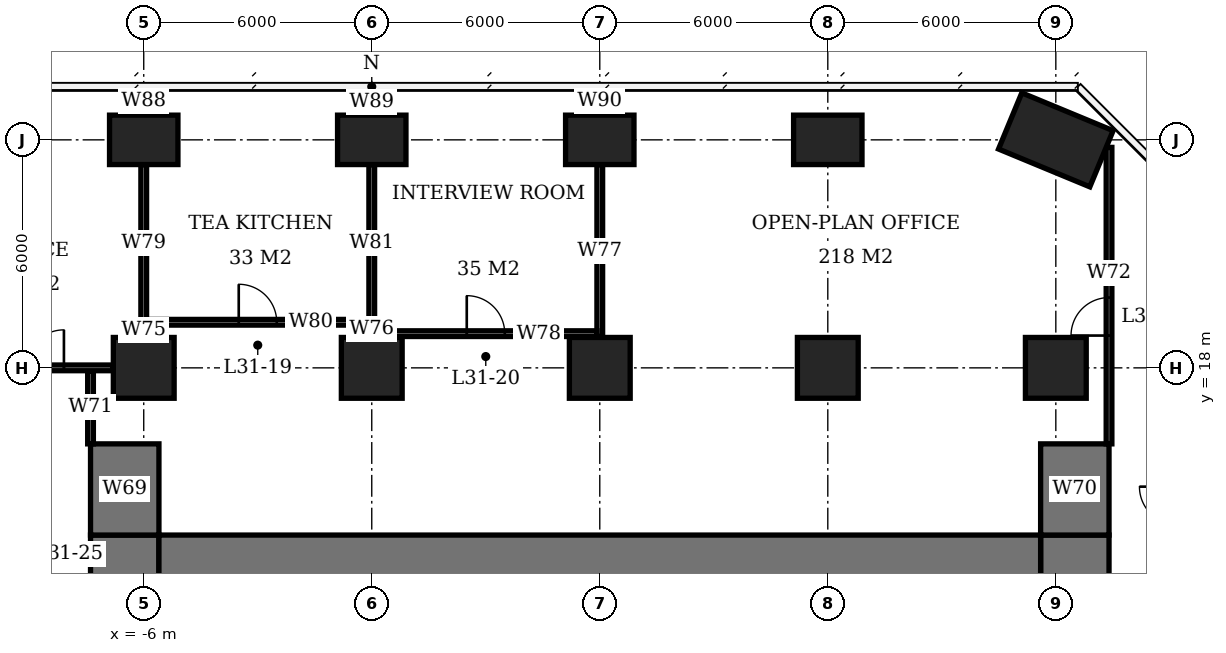
"""IFC4 building model, lengths in metres.
Left out: names, types, materials, properties, quantities, classifications, styles, units other than length and angle.
Written with IfcOpenShell. Run it as: python <this file> out.ifc"""

import sys

from ifc_helpers import new_model, si_unit, direction, frame, frame_2d, origin, origin_2d, place, context, subcontext, project, spatial, rectangle, extrude, element, fill, save


model = new_model("IFC4")
c1 = context("Model", 3, precision=1e-05, world=origin(), true_north=direction((0.0, 1.0)))
c2 = subcontext(c1, "Body", "Model", "MODEL_VIEW")
j1 = project(units=[si_unit("LENGTHUNIT", "METRE"), si_unit("PLANEANGLEUNIT", "RADIAN")], contexts=[c1])
p1 = place(None, origin())
s1 = spatial("IfcSite", under=j1, at=p1, CompositionType="ELEMENT")
p2 = place(p1, origin())
s2 = spatial("IfcBuilding", under=s1, at=p2, CompositionType="ELEMENT")
p3 = place(p2, frame((0.0, 0.0, 128.9)))
s3 = spatial("IfcBuildingStorey", under=s2, at=p3, CompositionType="ELEMENT", Elevation=128.9)
p4 = place(p3, frame((-6.0, 18.0, 0.0), z_axis=(0.0, 0.0, 1.0), x_axis=(1.0, 0.0, 0.0)))
e1 = element("IfcColumn", 1, at=p4, inside=s3, PredefinedType="COLUMN", context=c2, shape_type="SweptSolid", body=[
    extrude(rectangle(XDim=1.6, YDim=1.6, at=origin_2d()), origin(), (0.0, 0.0, 1.0), 3.9),
])
p5 = place(p3, frame((-6.0, 24.0, 0.0), z_axis=(0.0, 0.0, 1.0), x_axis=(1.0, 0.0, 0.0)))
e2 = element("IfcColumn", 2, at=p5, inside=s3, PredefinedType="COLUMN", context=c2, shape_type="SweptSolid", body=[
    extrude(rectangle(XDim=1.8, YDim=1.3, at=origin_2d()), origin(), (0.0, 0.0, 1.0), 3.9),
])
p6 = place(p3, frame((0.0, 18.0, 0.0), z_axis=(0.0, 0.0, 1.0), x_axis=(1.0, 0.0, 0.0)))
e3 = element("IfcColumn", 3, at=p6, inside=s3, PredefinedType="COLUMN", context=c2, shape_type="SweptSolid", body=[
    extrude(rectangle(XDim=1.6, YDim=1.6, at=origin_2d()), origin(), (0.0, 0.0, 1.0), 3.9),
])
p7 = place(p3, frame((0.0, 24.0, 0.0), z_axis=(0.0, 0.0, 1.0), x_axis=(1.0, 0.0, 0.0)))
e4 = element("IfcColumn", 4, at=p7, inside=s3, PredefinedType="COLUMN", context=c2, shape_type="SweptSolid", body=[
    extrude(rectangle(XDim=1.8, YDim=1.3, at=origin_2d()), origin(), (0.0, 0.0, 1.0), 3.9),
])
p8 = place(p3, frame((6.0, 18.0, 0.0), z_axis=(0.0, 0.0, 1.0), x_axis=(1.0, 0.0, 0.0)))
e5 = element("IfcColumn", 5, at=p8, inside=s3, PredefinedType="COLUMN", context=c2, shape_type="SweptSolid", body=[
    extrude(rectangle(XDim=1.6, YDim=1.6, at=origin_2d()), origin(), (0.0, 0.0, 1.0), 3.9),
])
p9 = place(p3, frame((6.0, 24.0, 0.0), z_axis=(0.0, 0.0, 1.0), x_axis=(1.0, 0.0, 0.0)))
e6 = element("IfcColumn", 6, at=p9, inside=s3, PredefinedType="COLUMN", context=c2, shape_type="SweptSolid", body=[
    extrude(rectangle(XDim=1.8, YDim=1.3, at=origin_2d()), origin(), (0.0, 0.0, 1.0), 3.9),
])
p10 = place(p3, frame((12.0, 18.0, 0.0), z_axis=(0.0, 0.0, 1.0), x_axis=(1.0, 0.0, 0.0)))
e7 = element("IfcColumn", 7, at=p10, inside=s3, PredefinedType="COLUMN", context=c2, shape_type="SweptSolid", body=[
    extrude(rectangle(XDim=1.6, YDim=1.6, at=origin_2d()), origin(), (0.0, 0.0, 1.0), 3.9),
])
p11 = place(p3, frame((12.0, 24.0, 0.0), z_axis=(0.0, 0.0, 1.0), x_axis=(1.0, 0.0, 0.0)))
e8 = element("IfcColumn", 8, at=p11, inside=s3, PredefinedType="COLUMN", context=c2, shape_type="SweptSolid", body=[
    extrude(rectangle(XDim=1.8, YDim=1.3, at=origin_2d()), origin(), (0.0, 0.0, 1.0), 3.9),
])
p12 = place(p3, frame((18.0, 18.0, 0.0), z_axis=(0.0, 0.0, 1.0), x_axis=(1.0, 0.0, 0.0)))
e9 = element("IfcColumn", 9, at=p12, inside=s3, PredefinedType="COLUMN", context=c2, shape_type="SweptSolid", body=[
    extrude(rectangle(XDim=1.6, YDim=1.6, at=origin_2d()), origin(), (0.0, 0.0, 1.0), 3.9),
])
p13 = place(p3, frame((18.0, 24.0, 0.0), z_axis=(0.0, 0.0, 1.0), x_axis=(0.923879532511, -0.382683432365, 0.0)))
e10 = element("IfcColumn", 10, at=p13, inside=s3, PredefinedType="COLUMN", context=c2, shape_type="SweptSolid", body=[
    extrude(rectangle(XDim=2.6, YDim=1.6, at=origin_2d()), origin(), (0.0, 0.0, 1.0), 3.9),
])
p14 = place(p3, frame((-5.6, 12.6, 0.0), z_axis=(0.0, 0.0, 1.0), x_axis=(1.0, 0.0, 0.0)))
e11 = element("IfcWall", 11, at=p14, inside=s3, PredefinedType="SHEAR", context=c2, shape_type="SweptSolid", body=[
    extrude(rectangle(XDim=23.2, YDim=2.0, at=frame_2d((11.6, 0.0))), origin(), (0.0, 0.0, 1.0), 3.9),
])
p15 = place(p3, frame((-6.5, -7.6, 0.0), z_axis=(0.0, 0.0, 1.0), x_axis=(0.0, 1.0, 0.0)))
e12 = element("IfcWall", 12, at=p15, inside=s3, PredefinedType="SHEAR", context=c2, shape_type="SweptSolid", body=[
    extrude(rectangle(XDim=21.2, YDim=1.8, at=frame_2d((10.6, 0.0))), origin(), (0.0, 0.0, 1.0), 3.9),
])
p16 = place(p15, frame((7.8, 0.0, 0.0)))
e13 = element("IfcOpeningElement", 13, at=p16, cuts=e12, PredefinedType="OPENING", context=c2, shape_type="SweptSolid", body=[
    extrude(rectangle(XDim=1.8, YDim=2.4, at=frame_2d((0.9, 1.2))), frame((0.0, 0.91, 0.0), z_axis=(0.0, -1.0, 0.0), x_axis=(1.0, 0.0, 0.0)), (0.0, 0.0, 1.0), 1.82),
])
p17 = place(p3, frame((18.5, -7.6, 0.0), z_axis=(0.0, 0.0, 1.0), x_axis=(0.0, 1.0, 0.0)))
e14 = element("IfcWall", 14, at=p17, inside=s3, PredefinedType="SHEAR", context=c2, shape_type="SweptSolid", body=[
    extrude(rectangle(XDim=21.2, YDim=1.8, at=frame_2d((10.6, 0.0))), origin(), (0.0, 0.0, 1.0), 3.9),
])
p18 = place(p17, frame((9.2, 0.0, 0.0)))
e15 = element("IfcOpeningElement", 15, at=p18, cuts=e14, PredefinedType="OPENING", context=c2, shape_type="SweptSolid", body=[
    extrude(rectangle(XDim=1.8, YDim=2.4, at=frame_2d((0.9, 1.2))), frame((0.0, 0.91, 0.0), z_axis=(0.0, -1.0, 0.0), x_axis=(1.0, 0.0, 0.0)), (0.0, 0.0, 1.0), 1.82),
])
for number, where, z_axis, x_axis in (
    (16, (-6.5, 13.6, 0.0), (0.0, 0.0, 1.0), (0.0, 1.0, 0.0)),
    (17, (18.5, 13.6, 0.0), (0.0, 0.0, 1.0), (0.0, 1.0, 0.0)),
):
    element("IfcWall", number, at=place(p3, frame(where, z_axis=z_axis, x_axis=x_axis)), inside=s3, PredefinedType="SHEAR", context=c2, shape_type="SweptSolid", body=[
        extrude(rectangle(XDim=2.4, YDim=1.8, at=frame_2d((1.2, 0.0))), origin(), (0.0, 0.0, 1.0), 3.9),
    ])
p19 = place(p3, frame((-11.2, 18.0, 0.0), z_axis=(0.0, 0.0, 1.0), x_axis=(1.0, 0.0, 0.0)))
e18 = element("IfcWall", 18, at=p19, inside=s3, PredefinedType="PARTITIONING", context=c2, shape_type="SweptSolid", body=[
    extrude(rectangle(XDim=4.4, YDim=0.15, at=frame_2d((2.2, 0.0))), origin(), (0.0, 0.0, 1.0), 3.65),
])
p20 = place(p19, frame((2.1, 0.0, 0.0)))
e19 = element("IfcOpeningElement", 19, at=p20, cuts=e18, PredefinedType="OPENING", context=c2, shape_type="SweptSolid", body=[
    extrude(rectangle(XDim=1.0, YDim=2.1, at=frame_2d((0.5, 1.05))), frame((0.0, 0.085, 0.0), z_axis=(0.0, -1.0, 0.0), x_axis=(1.0, 0.0, 0.0)), (0.0, 0.0, 1.0), 0.17),
])
p21 = place(p3, frame((0.075, 18.9, 0.0), z_axis=(0.0, 0.0, 1.0), x_axis=(1.0, 0.0, 0.0)))
e20 = element("IfcWall", 20, at=p21, inside=s3, PredefinedType="PARTITIONING", context=c2, shape_type="SweptSolid", body=[
    extrude(rectangle(XDim=5.85, YDim=0.15, at=frame_2d((2.925, 0.0))), origin(), (0.0, 0.0, 1.0), 3.65),
])
p22 = place(p21, frame((2.425, 0.0, 0.0)))
e21 = element("IfcOpeningElement", 21, at=p22, cuts=e20, PredefinedType="OPENING", context=c2, shape_type="SweptSolid", body=[
    extrude(rectangle(XDim=1.0, YDim=2.1, at=frame_2d((0.5, 1.05))), frame((0.0, 0.085, 0.0), z_axis=(0.0, -1.0, 0.0), x_axis=(1.0, 0.0, 0.0)), (0.0, 0.0, 1.0), 0.17),
])
p23 = place(p3, frame((-5.925, 19.2, 0.0), z_axis=(0.0, 0.0, 1.0), x_axis=(1.0, 0.0, 0.0)))
e22 = element("IfcWall", 22, at=p23, inside=s3, PredefinedType="PARTITIONING", context=c2, shape_type="SweptSolid", body=[
    extrude(rectangle(XDim=5.85, YDim=0.15, at=frame_2d((2.925, 0.0))), origin(), (0.0, 0.0, 1.0), 3.65),
])
p24 = place(p23, frame((2.425, 0.0, 0.0)))
e23 = element("IfcOpeningElement", 23, at=p24, cuts=e22, PredefinedType="OPENING", context=c2, shape_type="SweptSolid", body=[
    extrude(rectangle(XDim=1.0, YDim=2.1, at=frame_2d((0.5, 1.05))), frame((0.0, 0.085, 0.0), z_axis=(0.0, -1.0, 0.0), x_axis=(1.0, 0.0, 0.0)), (0.0, 0.0, 1.0), 0.17),
])
p25 = place(p3, frame((-6.0, 18.8, 0.0), z_axis=(0.0, 0.0, 1.0), x_axis=(0.0, 1.0, 0.0)))
e24 = element("IfcWall", 24, at=p25, inside=s3, PredefinedType="PARTITIONING", context=c2, shape_type="SweptSolid", body=[
    extrude(rectangle(XDim=0.4, YDim=0.15, at=frame_2d((0.2, 0.0))), origin(), (0.0, 0.0, 1.0), 3.65),
])
p26 = place(p3, frame((-6.0, 19.2, 0.0), z_axis=(0.0, 0.0, 1.0), x_axis=(0.0, 1.0, 0.0)))
e25 = element("IfcWall", 25, at=p26, inside=s3, PredefinedType="PARTITIONING", context=c2, shape_type="SweptSolid", body=[
    extrude(rectangle(XDim=4.15, YDim=0.15, at=frame_2d((2.075, 0.0))), origin(), (0.0, 0.0, 1.0), 3.65),
])
p27 = place(p3, frame((-6.0, 24.65, 0.0), z_axis=(0.0, 0.0, 1.0), x_axis=(0.0, 1.0, 0.0)))
e26 = element("IfcWall", 26, at=p27, inside=s3, PredefinedType="PARTITIONING", context=c2, shape_type="SweptSolid", body=[
    extrude(rectangle(XDim=0.75, YDim=0.15, at=frame_2d((0.375, 0.0))), origin(), (0.0, 0.0, 1.0), 3.65),
])
p28 = place(p3, frame((0.0, 18.825, 0.0), z_axis=(0.0, 0.0, 1.0), x_axis=(0.0, 1.0, 0.0)))
e27 = element("IfcWall", 27, at=p28, inside=s3, PredefinedType="PARTITIONING", context=c2, shape_type="SweptSolid", body=[
    extrude(rectangle(XDim=0.375, YDim=0.15, at=frame_2d((0.188, 0.0))), origin(), (0.0, 0.0, 1.0), 3.65),
])
p29 = place(p3, frame((0.0, 19.2, 0.0), z_axis=(0.0, 0.0, 1.0), x_axis=(0.0, 1.0, 0.0)))
e28 = element("IfcWall", 28, at=p29, inside=s3, PredefinedType="PARTITIONING", context=c2, shape_type="SweptSolid", body=[
    extrude(rectangle(XDim=4.15, YDim=0.15, at=frame_2d((2.075, 0.0))), origin(), (0.0, 0.0, 1.0), 3.65),
])
p30 = place(p3, frame((0.0, 24.65, 0.0), z_axis=(0.0, 0.0, 1.0), x_axis=(0.0, 1.0, 0.0)))
e29 = element("IfcWall", 29, at=p30, inside=s3, PredefinedType="PARTITIONING", context=c2, shape_type="SweptSolid", body=[
    extrude(rectangle(XDim=0.7, YDim=0.15, at=frame_2d((0.35, 0.0))), origin(), (0.0, 0.0, 1.0), 3.65),
])
p31 = place(p3, frame((6.0, 18.825, 0.0), z_axis=(0.0, 0.0, 1.0), x_axis=(0.0, 1.0, 0.0)))
e30 = element("IfcWall", 30, at=p31, inside=s3, PredefinedType="PARTITIONING", context=c2, shape_type="SweptSolid", body=[
    extrude(rectangle(XDim=4.525, YDim=0.15, at=frame_2d((2.263, 0.0))), origin(), (0.0, 0.0, 1.0), 3.65),
])
p32 = place(p3, frame((6.0, 24.65, 0.0), z_axis=(0.0, 0.0, 1.0), x_axis=(0.0, 1.0, 0.0)))
e31 = element("IfcWall", 31, at=p32, inside=s3, PredefinedType="PARTITIONING", context=c2, shape_type="SweptSolid", body=[
    extrude(rectangle(XDim=0.75, YDim=0.15, at=frame_2d((0.375, 0.0))), origin(), (0.0, 0.0, 1.0), 3.65),
])
p33 = place(p3, frame((-7.4, 16.0, 0.0), z_axis=(0.0, 0.0, 1.0), x_axis=(0.0, 1.0, 0.0)))
e32 = element("IfcWall", 32, at=p33, inside=s3, PredefinedType="PARTITIONING", context=c2, shape_type="SweptSolid", body=[
    extrude(rectangle(XDim=1.925, YDim=0.15, at=frame_2d((0.962, 0.0))), origin(), (0.0, 0.0, 1.0), 3.65),
])
p34 = place(p3, frame((19.4, 16.0, 0.0), z_axis=(0.0, 0.0, 1.0), x_axis=(0.0, 1.0, 0.0)))
e33 = element("IfcWall", 33, at=p34, inside=s3, PredefinedType="PARTITIONING", context=c2, shape_type="SweptSolid", body=[
    extrude(rectangle(XDim=7.802, YDim=0.15, at=frame_2d((3.901, 0.0))), origin(), (0.0, 0.0, 1.0), 3.65),
])
p35 = place(p34, frame((2.85, 0.0, 0.0)))
e34 = element("IfcOpeningElement", 34, at=p35, cuts=e33, PredefinedType="OPENING", context=c2, shape_type="SweptSolid", body=[
    extrude(rectangle(XDim=1.0, YDim=2.1, at=frame_2d((0.5, 1.05))), frame((0.0, 0.085, 0.0), z_axis=(0.0, -1.0, 0.0), x_axis=(1.0, 0.0, 0.0)), (0.0, 0.0, 1.0), 0.17),
])
p36 = place(p20, origin())
e35 = element("IfcDoor", 35, at=p36, inside=s3, OperationType="SINGLE_SWING_RIGHT", PredefinedType="DOOR", context=c2, shape_type="SweptSolid", body=[
    extrude(rectangle(XDim=1.0, YDim=2.1, at=frame_2d((0.5, 1.05))), frame((0.0, 0.025, 0.0), z_axis=(0.0, -1.0, 0.0), x_axis=(1.0, 0.0, 0.0)), (0.0, 0.0, 1.0), 0.05),
])
fill(e19, e35)
p37 = place(p24, origin())
e36 = element("IfcDoor", 36, at=p37, inside=s3, OperationType="SINGLE_SWING_LEFT", PredefinedType="DOOR", context=c2, shape_type="SweptSolid", body=[
    extrude(rectangle(XDim=1.0, YDim=2.1, at=frame_2d((0.5, 1.05))), frame((0.0, 0.025, 0.0), z_axis=(0.0, -1.0, 0.0), x_axis=(1.0, 0.0, 0.0)), (0.0, 0.0, 1.0), 0.05),
])
fill(e23, e36)
p38 = place(p22, origin())
e37 = element("IfcDoor", 37, at=p38, inside=s3, OperationType="SINGLE_SWING_LEFT", PredefinedType="DOOR", context=c2, shape_type="SweptSolid", body=[
    extrude(rectangle(XDim=1.0, YDim=2.1, at=frame_2d((0.5, 1.05))), frame((0.0, 0.025, 0.0), z_axis=(0.0, -1.0, 0.0), x_axis=(1.0, 0.0, 0.0)), (0.0, 0.0, 1.0), 0.05),
])
fill(e21, e37)
p39 = place(p35, origin())
e38 = element("IfcDoor", 38, at=p39, inside=s3, OperationType="SINGLE_SWING_LEFT", PredefinedType="DOOR", context=c2, shape_type="SweptSolid", body=[
    extrude(rectangle(XDim=1.0, YDim=2.1, at=frame_2d((0.5, 1.05))), frame((0.0, 0.025, 0.0), z_axis=(0.0, -1.0, 0.0), x_axis=(1.0, 0.0, 0.0)), (0.0, 0.0, 1.0), 0.05),
])
fill(e34, e38)
save(model, sys.argv[1])
